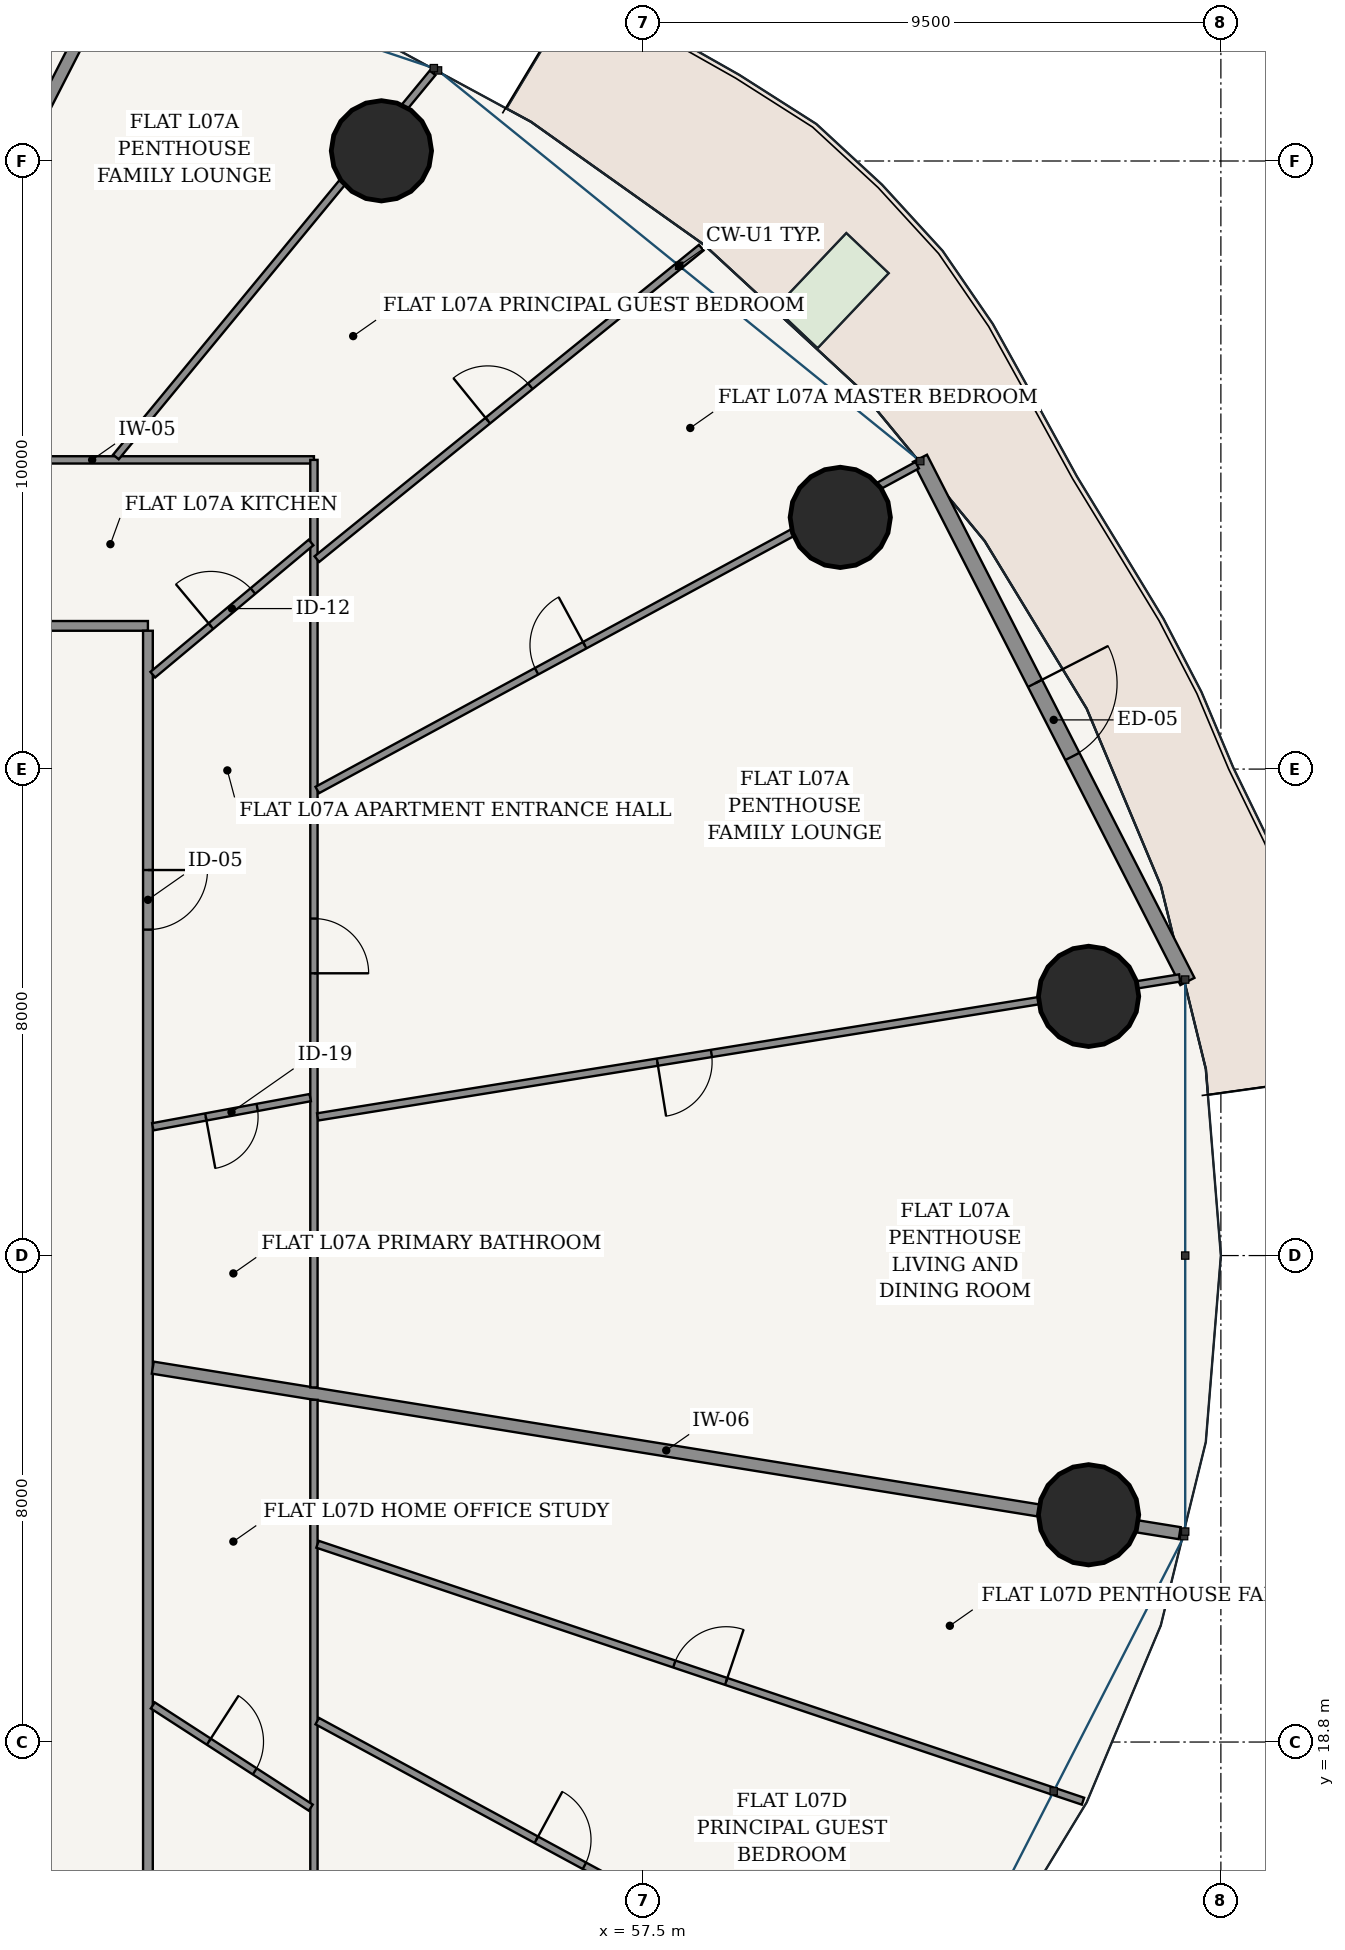
"""IFC4 building model, lengths in metres.
Left out: names, types, materials, properties, quantities, classifications, styles, units other than length and angle.
Written with IfcOpenShell. Run it as: python <this file> out.ifc"""

import sys

from ifc_helpers import new_model, si_unit, direction, frame, frame_2d, origin, origin_2d, place, context, subcontext, project, spatial, rectangle, hollow_circle, extrude, source, transform, mapped, element, fill, save


model = new_model("IFC4")
c1 = context("Model", 3, precision=1e-05, world=origin(), true_north=direction((-0.2419218956, 0.970295726276)))
c2 = subcontext(c1, "Body", "Model", "MODEL_VIEW")
j1 = project(units=[si_unit("LENGTHUNIT", "METRE"), si_unit("PLANEANGLEUNIT", "RADIAN")], contexts=[c1])
p1 = place(None, origin())
s1 = spatial("IfcSite", under=j1, at=p1, CompositionType="ELEMENT")
p2 = place(p1, origin())
s2 = spatial("IfcBuilding", under=s1, at=p2, CompositionType="ELEMENT")
p3 = place(p2, frame((0.0, 0.0, 31.2)))
s3 = spatial("IfcBuildingStorey", under=s2, at=p3, CompositionType="ELEMENT", Elevation=31.2)
for number, where, z_axis, x_axis in (
    (1, (64.824, 31.063, 0.0), (0.0, 0.0, 1.0), (1.0, 0.0, 0.0)),
    (2, (60.741, 38.939, 0.0), (0.0, 0.0, 1.0), (1.0, 0.0, 0.0)),
    (3, (53.195, 44.968, 0.0), (0.0, 0.0, 1.0), (1.0, 0.0, 0.0)),
    (4, (64.824, 22.537, 0.0), (0.0, 0.0, 1.0), (1.0, 0.0, 0.0)),
):
    element("IfcColumn", number, at=place(p3, frame(where, z_axis=z_axis, x_axis=x_axis)), inside=s3, PredefinedType="COLUMN", context=c2, shape_type="SweptSolid", body=[
        extrude(hollow_circle(Radius=0.825, WallThickness=0.05, at=origin_2d()), origin(), (0.0, 0.0, 1.0), 3.6),
    ])
p4 = place(p3, frame((66.45, 31.308, 0.0), z_axis=(0.0, 0.0, 1.0), x_axis=(-0.45523081716, 0.890373462715, 0.0)))
e5 = element("IfcWall", 5, at=p4, inside=s3, PredefinedType="SOLIDWALL", context=c2, shape_type="SweptSolid", body=[
    extrude(rectangle(XDim=9.662, YDim=0.26, at=frame_2d((4.831, 0.0))), origin(), (0.0, 0.0, 1.0), 3.32),
])
p5 = place(p4, frame((4.156, 0.0, 0.0)))
e6 = element("IfcOpeningElement", 6, at=p5, cuts=e5, PredefinedType="OPENING", context=c2, shape_type="SweptSolid", body=[
    extrude(rectangle(XDim=1.35, YDim=2.2, at=frame_2d((0.675, 1.1))), frame((0.0, 0.14, 0.0), z_axis=(0.0, -1.0, 0.0), x_axis=(1.0, 0.0, 0.0)), (0.0, 0.0, 1.0), 0.28),
])
p6 = place(p3, frame((26.645, 37.155, 0.0), z_axis=(0.0, 0.0, 1.0), x_axis=(1.0, 0.0, 0.0)))
e7 = element("IfcWall", 7, at=p6, inside=s3, PredefinedType="PARTITIONING", context=c2, shape_type="SweptSolid", body=[
    extrude(rectangle(XDim=22.71, YDim=0.16, at=frame_2d((11.355, 0.0))), origin(), (0.0, 0.0, 1.0), 2.688),
])
p7 = place(p6, frame((7.446, 0.0, 0.0)))
e8 = element("IfcOpeningElement", 8, at=p7, cuts=e7, PredefinedType="OPENING", context=c2, shape_type="SweptSolid", body=[
    extrude(rectangle(XDim=0.98, YDim=2.2, at=frame_2d((0.49, 1.1))), frame((0.0, 0.09, 0.0), z_axis=(0.0, -1.0, 0.0), x_axis=(1.0, 0.0, 0.0)), (0.0, 0.0, 1.0), 0.18),
])
p8 = place(p3, frame((49.355, 16.525, 0.0), z_axis=(0.0, 0.0, 1.0), x_axis=(0.0, 1.0, 0.0)))
e9 = element("IfcWall", 9, at=p8, inside=s3, PredefinedType="PARTITIONING", context=c2, shape_type="SweptSolid", body=[
    extrude(rectangle(XDim=20.55, YDim=0.16, at=frame_2d((10.275, 0.0))), origin(), (0.0, 0.0, 1.0), 2.688),
])
p9 = place(p8, frame((15.635, 0.0, 0.0)))
e10 = element("IfcOpeningElement", 10, at=p9, cuts=e9, PredefinedType="OPENING", context=c2, shape_type="SweptSolid", body=[
    extrude(rectangle(XDim=0.98, YDim=2.2, at=frame_2d((0.49, 1.1))), frame((0.0, 0.09, 0.0), z_axis=(0.0, -1.0, 0.0), x_axis=(1.0, 0.0, 0.0)), (0.0, 0.0, 1.0), 0.18),
])
p10 = place(p3, frame((49.435, 24.957, 0.0), z_axis=(0.0, 0.0, 1.0), x_axis=(0.987258195973, -0.159126536076, 0.0)))
e11 = element("IfcWall", 11, at=p10, inside=s3, PredefinedType="PARTITIONING", context=c2, shape_type="SweptSolid", body=[
    extrude(rectangle(XDim=17.105, YDim=0.2, at=frame_2d((8.553, 0.0))), origin(), (0.0, 0.0, 1.0), 2.688),
])
p11 = place(p3, frame((44.791, 39.885, 0.0), z_axis=(0.0, 0.0, 1.0), x_axis=(1.0, 0.0, 0.0)))
e12 = element("IfcWall", 12, at=p11, inside=s3, PredefinedType="PARTITIONING", context=c2, shape_type="SweptSolid", body=[
    extrude(rectangle(XDim=7.294, YDim=0.12, at=frame_2d((3.647, 0.0))), origin(), (0.0, 0.0, 1.0), 2.688),
])
p12 = place(p11, frame((1.705, 0.0, 0.0)))
e13 = element("IfcOpeningElement", 13, at=p12, cuts=e12, PredefinedType="OPENING", context=c2, shape_type="SweptSolid", body=[
    extrude(rectangle(XDim=0.9, YDim=2.15, at=frame_2d((0.45, 1.075))), frame((0.0, 0.07, 0.0), z_axis=(0.0, -1.0, 0.0), x_axis=(1.0, 0.0, 0.0)), (0.0, 0.0, 1.0), 0.14),
])
p13 = place(p3, frame((52.085, 39.885, 0.0), z_axis=(0.0, 0.0, 1.0), x_axis=(0.0, -1.0, 0.0)))
e14 = element("IfcWall", 14, at=p13, inside=s3, PredefinedType="PARTITIONING", context=c2, shape_type="SweptSolid", body=[
    extrude(rectangle(XDim=15.253, YDim=0.12, at=frame_2d((7.627, 0.0))), origin(), (0.0, 0.0, 1.0), 2.688),
])
p14 = place(p13, frame((7.543, 0.0, 0.0)))
e15 = element("IfcOpeningElement", 15, at=p14, cuts=e14, PredefinedType="OPENING", context=c2, shape_type="SweptSolid", body=[
    extrude(rectangle(XDim=0.9, YDim=2.15, at=frame_2d((0.45, 1.075))), frame((0.0, 0.07, 0.0), z_axis=(0.0, -1.0, 0.0), x_axis=(1.0, 0.0, 0.0)), (0.0, 0.0, 1.0), 0.14),
])
p15 = place(p3, frame((52.146, 29.08, 0.0), z_axis=(0.0, 0.0, 1.0), x_axis=(0.987255773689, 0.159141563768, 0.0)))
e16 = element("IfcWall", 16, at=p15, inside=s3, PredefinedType="PARTITIONING", context=c2, shape_type="SweptSolid", body=[
    extrude(rectangle(XDim=14.359, YDim=0.12, at=frame_2d((7.18, 0.0))), origin(), (0.0, 0.0, 1.0), 2.688),
])
p16 = place(p15, frame((5.659, 0.0, 0.0)))
e17 = element("IfcOpeningElement", 17, at=p16, cuts=e16, PredefinedType="OPENING", context=c2, shape_type="SweptSolid", body=[
    extrude(rectangle(XDim=0.9, YDim=2.15, at=frame_2d((0.45, 1.075))), frame((0.0, 0.07, 0.0), z_axis=(0.0, -1.0, 0.0), x_axis=(1.0, 0.0, 0.0)), (0.0, 0.0, 1.0), 0.14),
])
p17 = place(p3, frame((52.139, 34.456, 0.0), z_axis=(0.0, 0.0, 1.0), x_axis=(0.879372452045, 0.476134529922, 0.0)))
e18 = element("IfcWall", 18, at=p17, inside=s3, PredefinedType="PARTITIONING", context=c2, shape_type="SweptSolid", body=[
    extrude(rectangle(XDim=11.219, YDim=0.12, at=frame_2d((5.61, 0.0))), origin(), (0.0, 0.0, 1.0), 2.688),
])
p18 = place(p17, frame((4.102, 0.0, 0.0)))
e19 = element("IfcOpeningElement", 19, at=p18, cuts=e18, PredefinedType="OPENING", context=c2, shape_type="SweptSolid", body=[
    extrude(rectangle(XDim=0.9, YDim=2.15, at=frame_2d((0.45, 1.075))), frame((0.0, 0.07, 0.0), z_axis=(0.0, -1.0, 0.0), x_axis=(1.0, 0.0, 0.0)), (0.0, 0.0, 1.0), 0.14),
])
p19 = place(p3, frame((52.133, 38.253, 0.0), z_axis=(0.0, 0.0, 1.0), x_axis=(0.776936623447, 0.629578814087, 0.0)))
e20 = element("IfcWall", 20, at=p19, inside=s3, PredefinedType="PARTITIONING", context=c2, shape_type="SweptSolid", body=[
    extrude(rectangle(XDim=8.136, YDim=0.12, at=frame_2d((4.068, 0.0))), origin(), (0.0, 0.0, 1.0), 2.762),
])
p20 = place(p19, frame((3.618, 0.0, 0.0)))
e21 = element("IfcOpeningElement", 21, at=p20, cuts=e20, PredefinedType="OPENING", context=c2, shape_type="SweptSolid", body=[
    extrude(rectangle(XDim=0.9, YDim=2.15, at=frame_2d((0.45, 1.075))), frame((0.0, 0.07, 0.0), z_axis=(0.0, -1.0, 0.0), x_axis=(1.0, 0.0, 0.0)), (0.0, 0.0, 1.0), 0.14),
])
p21 = place(p3, frame((48.829, 39.933, 0.0), z_axis=(0.0, 0.0, 1.0), x_axis=(0.636192172227, 0.771530634516, 0.0)))
e22 = element("IfcWall", 22, at=p21, inside=s3, PredefinedType="PARTITIONING", context=c2, shape_type="SweptSolid", body=[
    extrude(rectangle(XDim=8.186, YDim=0.12, at=frame_2d((4.093, 0.0))), origin(), (0.0, 0.0, 1.0), 2.688),
])
p22 = place(p3, frame((49.435, 28.918, 0.0), z_axis=(0.0, 0.0, 1.0), x_axis=(0.983277085422, 0.182115823818, 0.0)))
e23 = element("IfcWall", 23, at=p22, inside=s3, PredefinedType="PARTITIONING", context=c2, shape_type="SweptSolid", body=[
    extrude(rectangle(XDim=2.633, YDim=0.12, at=frame_2d((1.316, 0.0))), origin(), (0.0, 0.0, 1.0), 3.32),
])
p23 = place(p22, frame((0.886, 0.0, 0.0)))
e24 = element("IfcOpeningElement", 24, at=p23, cuts=e23, PredefinedType="OPENING", context=c2, shape_type="SweptSolid", body=[
    extrude(rectangle(XDim=0.86, YDim=2.15, at=frame_2d((0.43, 1.075))), frame((0.0, 0.07, 0.0), z_axis=(0.0, -1.0, 0.0), x_axis=(1.0, 0.0, 0.0)), (0.0, 0.0, 1.0), 0.14),
])
p24 = place(p3, frame((49.435, 36.353, 0.0), z_axis=(0.0, 0.0, 1.0), x_axis=(0.76742398833, 0.641139939589, 0.0)))
e25 = element("IfcWall", 25, at=p24, inside=s3, PredefinedType="PARTITIONING", context=c2, shape_type="SweptSolid", body=[
    extrude(rectangle(XDim=3.391, YDim=0.12, at=frame_2d((1.695, 0.0))), origin(), (0.0, 0.0, 1.0), 2.999),
])
p25 = place(p24, frame((1.246, 0.0, 0.0)))
e26 = element("IfcOpeningElement", 26, at=p25, cuts=e25, PredefinedType="OPENING", context=c2, shape_type="SweptSolid", body=[
    extrude(rectangle(XDim=0.9, YDim=2.15, at=frame_2d((0.45, 1.075))), frame((0.0, 0.07, 0.0), z_axis=(0.0, -1.0, 0.0), x_axis=(1.0, 0.0, 0.0)), (0.0, 0.0, 1.0), 0.14),
])
p26 = place(p3, frame((43.335, 37.237, 0.0), z_axis=(0.0, 0.0, 1.0), x_axis=(0.455148959499, 0.890415310216, 0.0)))
e27 = element("IfcWall", 27, at=p26, inside=s3, PredefinedType="PARTITIONING", context=c2, shape_type="SweptSolid", body=[
    extrude(rectangle(XDim=12.598, YDim=0.2, at=frame_2d((6.299, 0.0))), origin(), (0.0, 0.0, 1.0), 2.762),
])
p27 = place(p3, frame((52.085, 24.428, 0.0), z_axis=(0.0, 0.0, 1.0), x_axis=(0.0, -1.0, 0.0)))
e28 = element("IfcWall", 28, at=p27, inside=s3, PredefinedType="PARTITIONING", context=c2, shape_type="SweptSolid", body=[
    extrude(rectangle(XDim=10.713, YDim=0.12, at=frame_2d((5.356, 0.0))), origin(), (0.0, 0.0, 1.0), 2.688),
])
p28 = place(p27, frame((8.094, 0.0, 0.0)))
e29 = element("IfcOpeningElement", 29, at=p28, cuts=e28, PredefinedType="OPENING", context=c2, shape_type="SweptSolid", body=[
    extrude(rectangle(XDim=0.9, YDim=2.15, at=frame_2d((0.45, 1.075))), frame((0.0, 0.07, 0.0), z_axis=(0.0, -1.0, 0.0), x_axis=(1.0, 0.0, 0.0)), (0.0, 0.0, 1.0), 0.14),
])
p29 = place(p3, frame((52.139, 19.144, 0.0), z_axis=(0.0, 0.0, 1.0), x_axis=(0.879372452045, -0.476134529922, 0.0)))
e30 = element("IfcWall", 30, at=p29, inside=s3, PredefinedType="PARTITIONING", context=c2, shape_type="SweptSolid", body=[
    extrude(rectangle(XDim=11.219, YDim=0.12, at=frame_2d((5.61, 0.0))), origin(), (0.0, 0.0, 1.0), 2.688),
])
p30 = place(p29, frame((4.097, 0.0, 0.0)))
e31 = element("IfcOpeningElement", 31, at=p30, cuts=e30, PredefinedType="OPENING", context=c2, shape_type="SweptSolid", body=[
    extrude(rectangle(XDim=0.9, YDim=2.15, at=frame_2d((0.45, 1.075))), frame((0.0, 0.07, 0.0), z_axis=(0.0, -1.0, 0.0), x_axis=(1.0, 0.0, 0.0)), (0.0, 0.0, 1.0), 0.14),
])
p31 = place(p3, frame((52.144, 22.052, 0.0), z_axis=(0.0, 0.0, 1.0), x_axis=(0.948023034133, -0.318201707653, 0.0)))
e32 = element("IfcWall", 32, at=p31, inside=s3, PredefinedType="PARTITIONING", context=c2, shape_type="SweptSolid", body=[
    extrude(rectangle(XDim=13.279, YDim=0.12, at=frame_2d((6.639, 0.0))), origin(), (0.0, 0.0, 1.0), 2.762),
])
p32 = place(p31, frame((6.189, 0.0, 0.0)))
e33 = element("IfcOpeningElement", 33, at=p32, cuts=e32, PredefinedType="OPENING", context=c2, shape_type="SweptSolid", body=[
    extrude(rectangle(XDim=0.9, YDim=2.15, at=frame_2d((0.45, 1.075))), frame((0.0, 0.07, 0.0), z_axis=(0.0, -1.0, 0.0), x_axis=(1.0, 0.0, 0.0)), (0.0, 0.0, 1.0), 0.14),
])
p33 = place(p3, frame((49.435, 19.402, 0.0), z_axis=(0.0, 0.0, 1.0), x_axis=(0.839582858019, -0.543231649042, 0.0)))
e34 = element("IfcWall", 34, at=p33, inside=s3, PredefinedType="PARTITIONING", context=c2, shape_type="SweptSolid", body=[
    extrude(rectangle(XDim=3.094, YDim=0.12, at=frame_2d((1.547, 0.0))), origin(), (0.0, 0.0, 1.0), 3.32),
])
p34 = place(p33, frame((1.097, 0.0, 0.0)))
e35 = element("IfcOpeningElement", 35, at=p34, cuts=e34, PredefinedType="OPENING", context=c2, shape_type="SweptSolid", body=[
    extrude(rectangle(XDim=0.9, YDim=2.15, at=frame_2d((0.45, 1.075))), frame((0.0, 0.07, 0.0), z_axis=(0.0, -1.0, 0.0), x_axis=(1.0, 0.0, 0.0)), (0.0, 0.0, 1.0), 0.14),
])
m1 = source(origin(), c2, "Body", "SweptSolid", [
    extrude(rectangle(XDim=1.35, YDim=2.2, at=frame_2d((0.675, 1.1))), frame((0.0, 0.025, 0.0), z_axis=(0.0, -1.0, 0.0), x_axis=(1.0, 0.0, 0.0)), (0.0, 0.0, 1.0), 0.05),
])
p35 = place(p5, frame((1.35, 0.0, 0.0), z_axis=(0.0, 0.0, 1.0), x_axis=(-1.0, 0.0, 0.0)))
e36 = element("IfcDoor", 36, at=p35, inside=s3, OperationType="SINGLE_SWING_LEFT", PredefinedType="DOOR", context=c2, shape_type="MappedRepresentation", body=[
    mapped(m1, transform((0.0, 0.0, 0.0), scale=1.0)),
])
fill(e6, e36)
m2 = source(origin(), c2, "Body", "SweptSolid", [
    extrude(rectangle(XDim=0.98, YDim=2.2, at=frame_2d((0.49, 1.1))), frame((0.0, 0.025, 0.0), z_axis=(0.0, -1.0, 0.0), x_axis=(1.0, 0.0, 0.0)), (0.0, 0.0, 1.0), 0.05),
])
p36 = place(p9, frame((0.98, 0.0, 0.0), z_axis=(0.0, 0.0, 1.0), x_axis=(-1.0, 0.0, 0.0)))
e37 = element("IfcDoor", 37, at=p36, inside=s3, OperationType="SINGLE_SWING_LEFT", PredefinedType="DOOR", context=c2, shape_type="MappedRepresentation", body=[
    mapped(m2, transform((0.0, 0.0, 0.0), scale=1.0)),
])
fill(e10, e37)
m3 = source(origin(), c2, "Body", "SweptSolid", [
    extrude(rectangle(XDim=0.86, YDim=2.15, at=frame_2d((0.43, 1.075))), frame((0.0, 0.025, 0.0), z_axis=(0.0, -1.0, 0.0), x_axis=(1.0, 0.0, 0.0)), (0.0, 0.0, 1.0), 0.05),
])
p37 = place(p23, frame((0.86, 0.0, 0.0), z_axis=(0.0, 0.0, 1.0), x_axis=(-1.0, 0.0, 0.0)))
e38 = element("IfcDoor", 38, at=p37, inside=s3, OperationType="SINGLE_SWING_RIGHT", PredefinedType="DOOR", context=c2, shape_type="MappedRepresentation", body=[
    mapped(m3, transform((0.0, 0.0, 0.0), scale=1.0)),
])
fill(e24, e38)
m4 = source(origin(), c2, "Body", "SweptSolid", [
    extrude(rectangle(XDim=0.9, YDim=2.15, at=frame_2d((0.45, 1.075))), frame((0.0, 0.025, 0.0), z_axis=(0.0, -1.0, 0.0), x_axis=(1.0, 0.0, 0.0)), (0.0, 0.0, 1.0), 0.05),
])
p38 = place(p25, origin())
e39 = element("IfcDoor", 39, at=p38, inside=s3, OperationType="SINGLE_SWING_LEFT", PredefinedType="DOOR", context=c2, shape_type="MappedRepresentation", body=[
    mapped(m4, transform((0.0, 0.0, 0.0), scale=1.0)),
])
fill(e26, e39)
p39 = place(p14, origin())
e40 = element("IfcDoor", 40, at=p39, inside=s3, OperationType="SINGLE_SWING_RIGHT", PredefinedType="DOOR", context=c2, shape_type="MappedRepresentation", body=[
    mapped(m4, transform((0.0, 0.0, 0.0), scale=1.0)),
])
fill(e15, e40)
p40 = place(p18, origin())
e41 = element("IfcDoor", 41, at=p40, inside=s3, OperationType="SINGLE_SWING_RIGHT", PredefinedType="DOOR", context=c2, shape_type="MappedRepresentation", body=[
    mapped(m4, transform((0.0, 0.0, 0.0), scale=1.0)),
])
fill(e19, e41)
p41 = place(p20, origin())
e42 = element("IfcDoor", 42, at=p41, inside=s3, OperationType="SINGLE_SWING_LEFT", PredefinedType="DOOR", context=c2, shape_type="MappedRepresentation", body=[
    mapped(m4, transform((0.0, 0.0, 0.0), scale=1.0)),
])
fill(e21, e42)
p42 = place(p16, frame((0.9, 0.0, 0.0), z_axis=(0.0, 0.0, 1.0), x_axis=(-1.0, 0.0, 0.0)))
e43 = element("IfcDoor", 43, at=p42, inside=s3, OperationType="SINGLE_SWING_RIGHT", PredefinedType="DOOR", context=c2, shape_type="MappedRepresentation", body=[
    mapped(m4, transform((0.0, 0.0, 0.0), scale=1.0)),
])
fill(e17, e43)
p43 = place(p34, origin())
e44 = element("IfcDoor", 44, at=p43, inside=s3, OperationType="SINGLE_SWING_LEFT", PredefinedType="DOOR", context=c2, shape_type="MappedRepresentation", body=[
    mapped(m4, transform((0.0, 0.0, 0.0), scale=1.0)),
])
fill(e35, e44)
p44 = place(p30, origin())
e45 = element("IfcDoor", 45, at=p44, inside=s3, OperationType="SINGLE_SWING_LEFT", PredefinedType="DOOR", context=c2, shape_type="MappedRepresentation", body=[
    mapped(m4, transform((0.0, 0.0, 0.0), scale=1.0)),
])
fill(e31, e45)
p45 = place(p32, origin())
e46 = element("IfcDoor", 46, at=p45, inside=s3, OperationType="SINGLE_SWING_RIGHT", PredefinedType="DOOR", context=c2, shape_type="MappedRepresentation", body=[
    mapped(m4, transform((0.0, 0.0, 0.0), scale=1.0)),
])
fill(e33, e46)
save(model, sys.argv[1])
